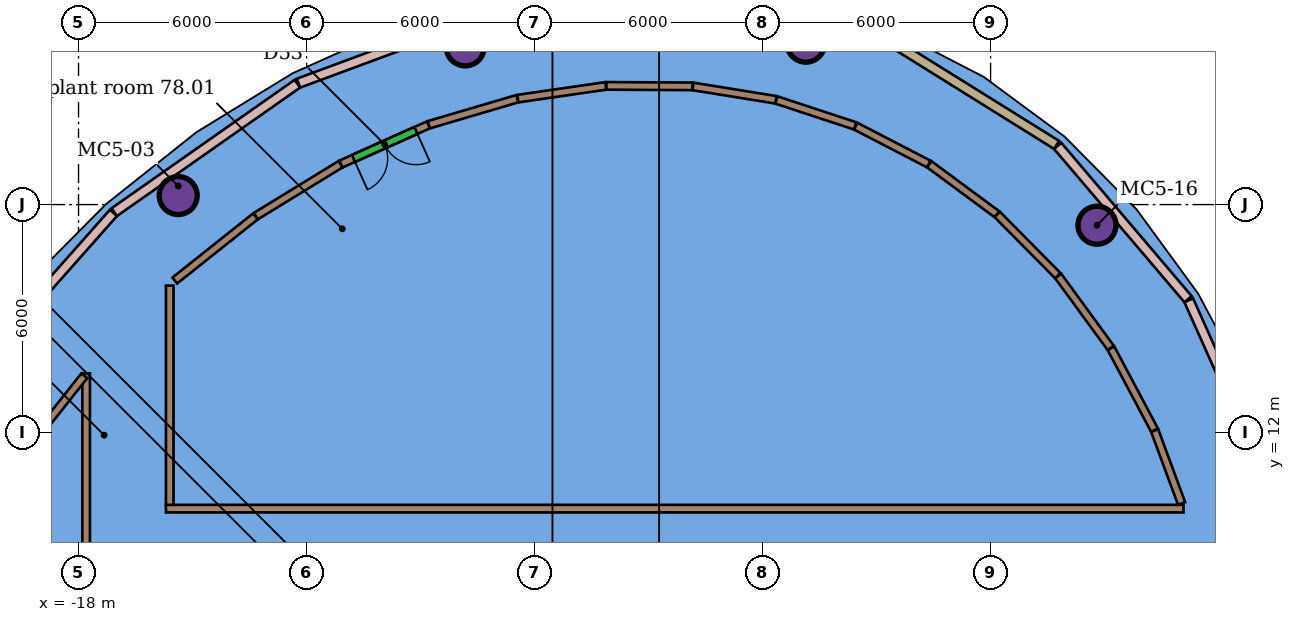
"""IFC4 building model, lengths in metres.
Left out: names, types, materials, properties, quantities, classifications, styles, units other than length and angle.
Written with IfcOpenShell. Run it as: python <this file> out.ifc"""

import sys

from ifc_helpers import new_model, si_unit, direction, frame, frame_2d, origin, origin_2d, place, context, subcontext, project, spatial, rectangle, hollow_circle, extrude, element, fill, save


model = new_model("IFC4")
c1 = context("Model", 3, precision=1e-05, world=origin(), true_north=direction((0.0, 1.0)))
c2 = subcontext(c1, "Body", "Model", "MODEL_VIEW")
j1 = project(units=[si_unit("LENGTHUNIT", "METRE"), si_unit("PLANEANGLEUNIT", "RADIAN")], contexts=[c1])
p1 = place(None, origin())
s1 = spatial("IfcSite", under=j1, at=p1, CompositionType="ELEMENT")
p2 = place(p1, origin())
s2 = spatial("IfcBuilding", under=s1, at=p2, CompositionType="ELEMENT")
p3 = place(p2, frame((0.0, 0.0, 312.9)))
s3 = spatial("IfcBuildingStorey", under=s2, at=p3, CompositionType="ELEMENT", Elevation=312.9)
for number, where, z_axis, x_axis in (
    (1, (1.138, 22.247, 0.0), (0.0, 0.0, 1.0), (1.0, 0.0, 0.0)),
    (2, (-7.825, 22.149, 0.0), (0.0, 0.0, 1.0), (1.0, 0.0, 0.0)),
    (3, (-15.377, 18.238, 0.0), (0.0, 0.0, 1.0), (1.0, 0.0, 0.0)),
    (4, (8.8, 17.457, 0.0), (0.0, 0.0, 1.0), (1.0, 0.0, 0.0)),
):
    element("IfcColumn", number, at=place(p3, frame(where, z_axis=z_axis, x_axis=x_axis)), inside=s3, PredefinedType="COLUMN", context=c2, shape_type="SweptSolid", body=[
        extrude(hollow_circle(Radius=0.5, WallThickness=0.04, at=origin_2d()), origin(), (0.0, 0.0, 1.0), 4.0),
    ])
p4 = place(p3, frame((-15.7, 10.0, 0.0), z_axis=(0.0, 0.0, 1.0), x_axis=(1.0, 0.0, 0.0)))
e5 = element("IfcWall", 5, at=p4, inside=s3, PredefinedType="PARTITIONING", context=c2, shape_type="SweptSolid", body=[
    extrude(rectangle(XDim=26.776, YDim=0.2, at=frame_2d((13.388, 0.0))), origin(), (0.0, 0.0, 1.0), 3.65),
])
p5 = place(p3, frame((-17.8, -7.9, 0.0), z_axis=(0.0, 0.0, 1.0), x_axis=(0.0, 1.0, 0.0)))
e6 = element("IfcWall", 6, at=p5, inside=s3, PredefinedType="PARTITIONING", context=c2, shape_type="SweptSolid", body=[
    extrude(rectangle(XDim=21.458, YDim=0.2, at=frame_2d((10.729, 0.0))), origin(), (0.0, 0.0, 1.0), 3.65),
])
p6 = place(p3, frame((-15.6, 10.1, 0.0), z_axis=(0.0, 0.0, 1.0), x_axis=(0.0, 1.0, 0.0)))
e7 = element("IfcWall", 7, at=p6, inside=s3, PredefinedType="PARTITIONING", context=c2, shape_type="SweptSolid", body=[
    extrude(rectangle(XDim=5.767, YDim=0.2, at=frame_2d((2.884, 0.0))), origin(), (0.0, 0.0, 1.0), 3.65),
])
p7 = place(p3, frame((7.78, 16.119, 0.0), z_axis=(0.0, 0.0, 1.0), x_axis=(0.590082027637, -0.807343297897, 0.0)))
e8 = element("IfcWall", 8, at=p7, inside=s3, PredefinedType="PARTITIONING", context=c2, shape_type="SweptSolid", body=[
    extrude(rectangle(XDim=2.338, YDim=0.2, at=frame_2d((1.169, 0.0))), origin(), (0.0, 0.0, 1.0), 3.65),
])
p8 = place(p3, frame((9.168, 14.219, 0.0), z_axis=(0.0, 0.0, 1.0), x_axis=(0.469606334902, -0.882875920059, 0.0)))
e9 = element("IfcWall", 9, at=p8, inside=s3, PredefinedType="PARTITIONING", context=c2, shape_type="SweptSolid", body=[
    extrude(rectangle(XDim=2.44, YDim=0.2, at=frame_2d((1.22, 0.0))), origin(), (0.0, 0.0, 1.0), 3.65),
])
p9 = place(p3, frame((10.319, 12.052, 0.0), z_axis=(0.0, 0.0, 1.0), x_axis=(0.346197844841, -0.938161527791, 0.0)))
e10 = element("IfcWall", 10, at=p9, inside=s3, PredefinedType="PARTITIONING", context=c2, shape_type="SweptSolid", body=[
    extrude(rectangle(XDim=2.044, YDim=0.2, at=frame_2d((1.022, 0.0))), origin(), (0.0, 0.0, 1.0), 3.65),
])
p10 = place(p3, frame((-15.468, 16.001, 0.0), z_axis=(0.0, 0.0, 1.0), x_axis=(0.782665833332, 0.62244212047, 0.0)))
e11 = element("IfcWall", 11, at=p10, inside=s3, PredefinedType="PARTITIONING", context=c2, shape_type="SweptSolid", body=[
    extrude(rectangle(XDim=2.712, YDim=0.2, at=frame_2d((1.356, 0.0))), origin(), (0.0, 0.0, 1.0), 3.65),
])
p11 = place(p3, frame((-13.334, 17.696, 0.0), z_axis=(0.0, 0.0, 1.0), x_axis=(0.852667029926, 0.522454721557, 0.0)))
e12 = element("IfcWall", 12, at=p11, inside=s3, PredefinedType="PARTITIONING", context=c2, shape_type="SweptSolid", body=[
    extrude(rectangle(XDim=2.614, YDim=0.2, at=frame_2d((1.307, 0.0))), origin(), (0.0, 0.0, 1.0), 3.65),
])
p12 = place(p3, frame((-8.794, 20.097, 0.0), z_axis=(0.0, 0.0, 1.0), x_axis=(-0.912552955942, -0.408958558538, 0.0)))
e13 = element("IfcWall", 13, at=p12, inside=s3, PredefinedType="PARTITIONING", context=c2, shape_type="SweptSolid", body=[
    extrude(rectangle(XDim=2.521, YDim=0.2, at=frame_2d((1.26, 0.0))), origin(), (0.0, 0.0, 1.0), 3.65),
])
p13 = place(p12, frame((0.36, 0.0, 0.0)))
e14 = element("IfcOpeningElement", 14, at=p13, cuts=e13, PredefinedType="OPENING", context=c2, shape_type="SweptSolid", body=[
    extrude(rectangle(XDim=1.8, YDim=2.4, at=frame_2d((0.9, 1.2))), frame((0.0, 0.11, 0.0), z_axis=(0.0, -1.0, 0.0), x_axis=(1.0, 0.0, 0.0)), (0.0, 0.0, 1.0), 0.22),
])
p14 = place(p3, frame((-8.781, 20.101, 0.0), z_axis=(0.0, 0.0, 1.0), x_axis=(0.95934146389, 0.28224803925, 0.0)))
e15 = element("IfcWall", 15, at=p14, inside=s3, PredefinedType="PARTITIONING", context=c2, shape_type="SweptSolid", body=[
    extrude(rectangle(XDim=2.426, YDim=0.2, at=frame_2d((1.213, 0.0))), origin(), (0.0, 0.0, 1.0), 3.65),
])
p15 = place(p3, frame((-6.439, 20.788, 0.0), z_axis=(0.0, 0.0, 1.0), x_axis=(0.989671979467, 0.143350525141, 0.0)))
e16 = element("IfcWall", 16, at=p15, inside=s3, PredefinedType="PARTITIONING", context=c2, shape_type="SweptSolid", body=[
    extrude(rectangle(XDim=2.338, YDim=0.2, at=frame_2d((1.169, 0.0))), origin(), (0.0, 0.0, 1.0), 3.65),
])
p16 = place(p3, frame((-4.11, 21.123, 0.0), z_axis=(0.0, 0.0, 1.0), x_axis=(0.999986603133, -0.005176248997, 0.0)))
e17 = element("IfcWall", 17, at=p16, inside=s3, PredefinedType="PARTITIONING", context=c2, shape_type="SweptSolid", body=[
    extrude(rectangle(XDim=2.264, YDim=0.2, at=frame_2d((1.132, 0.0))), origin(), (0.0, 0.0, 1.0), 3.65),
])
p17 = place(p3, frame((-1.831, 21.109, 0.0), z_axis=(0.0, 0.0, 1.0), x_axis=(0.987257926423, -0.159128208423, 0.0)))
e18 = element("IfcWall", 18, at=p17, inside=s3, PredefinedType="PARTITIONING", context=c2, shape_type="SweptSolid", body=[
    extrude(rectangle(XDim=2.209, YDim=0.2, at=frame_2d((1.104, 0.0))), origin(), (0.0, 0.0, 1.0), 3.65),
])
p18 = place(p3, frame((0.365, 20.752, 0.0), z_axis=(0.0, 0.0, 1.0), x_axis=(0.949852302688, -0.312698901627, 0.0)))
e19 = element("IfcWall", 19, at=p18, inside=s3, PredefinedType="PARTITIONING", context=c2, shape_type="SweptSolid", body=[
    extrude(rectangle(XDim=2.181, YDim=0.2, at=frame_2d((1.09, 0.0))), origin(), (0.0, 0.0, 1.0), 3.65),
])
p19 = place(p3, frame((2.451, 20.063, 0.0), z_axis=(0.0, 0.0, 1.0), x_axis=(0.888068415533, -0.45971131086, 0.0)))
e20 = element("IfcWall", 20, at=p19, inside=s3, PredefinedType="PARTITIONING", context=c2, shape_type="SweptSolid", body=[
    extrude(rectangle(XDim=2.165, YDim=0.2, at=frame_2d((1.082, 0.0))), origin(), (0.0, 0.0, 1.0), 3.65),
])
p20 = place(p3, frame((4.387, 19.06, 0.0), z_axis=(0.0, 0.0, 1.0), x_axis=(0.80443326696, -0.594043027909, 0.0)))
e21 = element("IfcWall", 21, at=p20, inside=s3, PredefinedType="PARTITIONING", context=c2, shape_type="SweptSolid", body=[
    extrude(rectangle(XDim=2.209, YDim=0.2, at=frame_2d((1.105, 0.0))), origin(), (0.0, 0.0, 1.0), 3.65),
])
p21 = place(p3, frame((6.177, 17.739, 0.0), z_axis=(0.0, 0.0, 1.0), x_axis=(0.703376280453, -0.710817703843, 0.0)))
e22 = element("IfcWall", 22, at=p21, inside=s3, PredefinedType="PARTITIONING", context=c2, shape_type="SweptSolid", body=[
    extrude(rectangle(XDim=2.264, YDim=0.2, at=frame_2d((1.132, 0.0))), origin(), (0.0, 0.0, 1.0), 3.65),
])
p22 = place(p3, frame((-19.191, 11.799, 0.0), z_axis=(0.0, 0.0, 1.0), x_axis=(0.620321195124, 0.784347891487, 0.0)))
e23 = element("IfcWall", 23, at=p22, inside=s3, PredefinedType="PARTITIONING", context=c2, shape_type="SweptSolid", body=[
    extrude(rectangle(XDim=2.163, YDim=0.2, at=frame_2d((1.081, 0.0))), origin(), (0.0, 0.0, 1.0), 3.65),
])
p23 = place(p3, frame((-6.983, 23.131, 0.0), z_axis=(0.0, 0.0, 1.0), x_axis=(-0.937764073403, -0.34727300879, 0.0)))
e24 = element("IfcWall", 24, at=p23, inside=s3, PredefinedType="SOLIDWALL", context=c2, shape_type="SweptSolid", body=[
    extrude(rectangle(XDim=5.577, YDim=0.25, at=frame_2d((2.789, 0.0))), origin(), (0.0, 0.0, 1.0), 3.7),
])
p24 = place(p3, frame((-12.241, 21.18, 0.0), z_axis=(0.0, 0.0, 1.0), x_axis=(-0.818761962214, -0.574133128492, 0.0)))
e25 = element("IfcWall", 25, at=p24, inside=s3, PredefinedType="SOLIDWALL", context=c2, shape_type="SweptSolid", body=[
    extrude(rectangle(XDim=5.885, YDim=0.25, at=frame_2d((2.943, 0.0))), origin(), (0.0, 0.0, 1.0), 3.7),
])
p25 = place(p3, frame((-17.081, 17.781, 0.0), z_axis=(0.0, 0.0, 1.0), x_axis=(-0.663232601491, -0.748413332537, 0.0)))
e26 = element("IfcWall", 26, at=p25, inside=s3, PredefinedType="SOLIDWALL", context=c2, shape_type="SweptSolid", body=[
    extrude(rectangle(XDim=6.139, YDim=0.25, at=frame_2d((3.07, 0.0))), origin(), (0.0, 0.0, 1.0), 3.7),
])
p26 = place(p3, frame((13.49, 10.39, 0.0), z_axis=(0.0, 0.0, 1.0), x_axis=(-0.407989751163, 0.912986507538, 0.0)))
e27 = element("IfcWall", 27, at=p26, inside=s3, PredefinedType="SOLIDWALL", context=c2, shape_type="SweptSolid", body=[
    extrude(rectangle(XDim=5.577, YDim=0.25, at=frame_2d((2.789, 0.0))), origin(), (0.0, 0.0, 1.0), 3.7),
])
p27 = place(p3, frame((11.196, 15.511, 0.0), z_axis=(0.0, 0.0, 1.0), x_axis=(-0.647893308308, 0.761731094973, 0.0)))
e28 = element("IfcWall", 28, at=p27, inside=s3, PredefinedType="SOLIDWALL", context=c2, shape_type="SweptSolid", body=[
    extrude(rectangle(XDim=5.295, YDim=0.25, at=frame_2d((2.647, 0.0))), origin(), (0.0, 0.0, 1.0), 3.7),
])
p28 = place(p3, frame((7.737, 19.57, 0.0), z_axis=(0.0, 0.0, 1.0), x_axis=(-0.84872546146, 0.528833708333, 0.0)))
e29 = element("IfcWall", 29, at=p28, inside=s3, PredefinedType="SOLIDWALL", context=c2, shape_type="SweptSolid", body=[
    extrude(rectangle(XDim=5.125, YDim=0.25, at=frame_2d((2.562, 0.0))), origin(), (0.0, 0.0, 1.0), 4.0),
])
p29 = place(p13, origin())
e30 = element("IfcDoor", 30, at=p29, inside=s3, OperationType="DOUBLE_DOOR_SINGLE_SWING", PredefinedType="DOOR", context=c2, shape_type="SweptSolid", body=[
    extrude(rectangle(XDim=1.8, YDim=2.4, at=frame_2d((0.9, 1.2))), frame((0.0, 0.025, 0.0), z_axis=(0.0, -1.0, 0.0), x_axis=(1.0, 0.0, 0.0)), (0.0, 0.0, 1.0), 0.05),
])
fill(e14, e30)
save(model, sys.argv[1])
